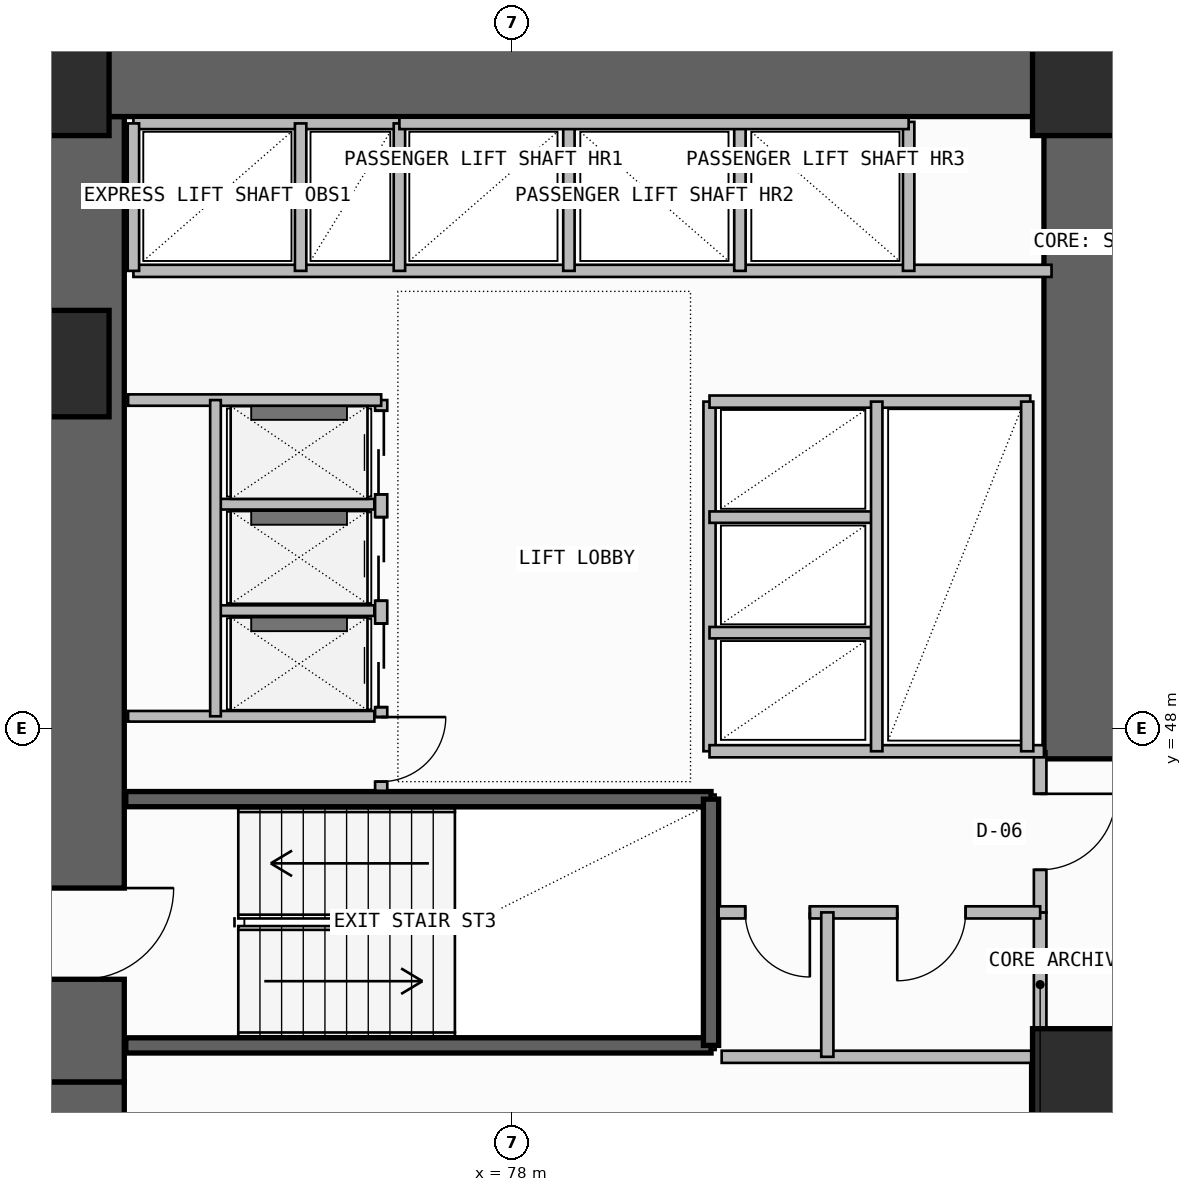
"""IFC4 building model, lengths in metres.
Left out: names, types, materials, properties, quantities, classifications, styles, units other than length and angle.
Written with IfcOpenShell. Run it as: python <this file> out.ifc"""

import sys

from ifc_helpers import new_model, si_unit, direction, frame, frame_2d, origin, origin_2d, place, context, subcontext, project, spatial, rectangle, extrude, element, fill, save


model = new_model("IFC4")
c1 = context("Model", 3, precision=1e-05, world=origin(), true_north=direction((0.0, 1.0)))
c2 = subcontext(c1, "Body", "Model", "MODEL_VIEW")
j1 = project(units=[si_unit("LENGTHUNIT", "METRE"), si_unit("PLANEANGLEUNIT", "RADIAN")], contexts=[c1])
p1 = place(None, origin())
s1 = spatial("IfcSite", under=j1, at=p1, CompositionType="ELEMENT")
p2 = place(p1, origin())
s2 = spatial("IfcBuilding", under=s1, at=p2, CompositionType="ELEMENT")
p3 = place(p2, frame((0.0, 0.0, 84.9)))
s3 = spatial("IfcBuildingStorey", under=s2, at=p3, CompositionType="ELEMENT", Elevation=84.9)
p4 = place(p3, frame((72.35, 35.5, -0.26), z_axis=(0.0, 0.0, 1.0), x_axis=(0.0, 1.0, 0.0)))
e1 = element("IfcWall", 1, at=p4, inside=s3, PredefinedType="SHEAR", context=c2, shape_type="SweptSolid", body=[
    extrude(rectangle(XDim=7.85, YDim=1.1, at=frame_2d((3.925, 0.0))), origin(), (0.0, 0.0, 1.0), 3.6),
])
p5 = place(p4, frame((1.45, 0.0, 0.26)))
e2 = element("IfcOpeningElement", 2, at=p5, cuts=e1, PredefinedType="OPENING", context=c2, shape_type="SweptSolid", body=[
    extrude(rectangle(XDim=1.2, YDim=2.2, at=frame_2d((0.6, 1.1))), frame((0.0, 0.56, 0.0), z_axis=(0.0, -1.0, 0.0), x_axis=(1.0, 0.0, 0.0)), (0.0, 0.0, 1.0), 1.12),
])
p6 = place(p3, frame((72.35, 43.35, -0.26), z_axis=(0.0, 0.0, 1.0), x_axis=(0.0, 1.0, 0.0)))
e3 = element("IfcWall", 3, at=p6, inside=s3, PredefinedType="SHEAR", context=c2, shape_type="SweptSolid", body=[
    extrude(rectangle(XDim=12.7, YDim=1.1, at=frame_2d((6.35, 0.0))), origin(), (0.0, 0.0, 1.0), 3.6),
])
p7 = place(p6, frame((1.35, 0.0, 0.26)))
e4 = element("IfcOpeningElement", 4, at=p7, cuts=e3, PredefinedType="OPENING", context=c2, shape_type="SweptSolid", body=[
    extrude(rectangle(XDim=1.2, YDim=2.2, at=frame_2d((0.6, 1.1))), frame((0.0, 0.56, 0.0), z_axis=(0.0, -1.0, 0.0), x_axis=(1.0, 0.0, 0.0)), (0.0, 0.0, 1.0), 1.12),
])
p8 = place(p3, frame((71.8, 56.6, -0.26), z_axis=(0.0, 0.0, 1.0), x_axis=(1.0, 0.0, 0.0)))
e5 = element("IfcWall", 5, at=p8, inside=s3, PredefinedType="SHEAR", context=c2, shape_type="SweptSolid", body=[
    extrude(rectangle(XDim=14.3, YDim=1.1, at=frame_2d((7.15, 0.0))), origin(), (0.0, 0.0, 1.0), 3.6),
])
p9 = place(p3, frame((85.55, 47.6, -0.26), z_axis=(0.0, 0.0, 1.0), x_axis=(0.0, 1.0, 0.0)))
e6 = element("IfcWall", 6, at=p9, inside=s3, PredefinedType="SHEAR", context=c2, shape_type="SweptSolid", body=[
    extrude(rectangle(XDim=8.45, YDim=1.1, at=frame_2d((4.225, 0.0))), origin(), (0.0, 0.0, 1.0), 3.6),
])
for number, where, z_axis, x_axis in (
    (7, (85.55, 43.35, 0.0), (0.0, 0.0, 1.0), (1.0, 0.0, 0.0)),
    (8, (72.0, 52.8, 0.0), (0.0, 0.0, 1.0), (1.0, 0.0, 0.0)),
    (9, (72.0, 56.5, 0.0), (0.0, 0.0, 1.0), (1.0, 0.0, 0.0)),
    (10, (85.55, 56.5, 0.0), (0.0, 0.0, 1.0), (1.0, 0.0, 0.0)),
):
    element("IfcColumn", number, at=place(p3, frame(where, z_axis=z_axis, x_axis=x_axis)), inside=s3, PredefinedType="COLUMN", context=c2, shape_type="SweptSolid", body=[
        extrude(rectangle(XDim=1.4, YDim=1.4, at=origin_2d()), origin(), (0.0, 0.0, 1.0), 3.6),
    ])
p10 = place(p3, frame((84.92, 38.85, 0.0), z_axis=(0.0, 0.0, 1.0), x_axis=(0.0, 1.0, 0.0)))
e11 = element("IfcWall", 11, at=p10, inside=s3, PredefinedType="SOLIDWALL", context=c2, shape_type="SweptSolid", body=[
    extrude(rectangle(XDim=4.83, YDim=0.2, at=frame_2d((2.415, 0.0))), origin(), (0.0, 0.0, 1.0), 3.34),
])
p11 = place(p10, frame((1.25, 0.0, 0.0)))
e12 = element("IfcOpeningElement", 12, at=p11, cuts=e11, PredefinedType="OPENING", context=c2, shape_type="SweptSolid", body=[
    extrude(rectangle(XDim=1.1, YDim=2.2, at=frame_2d((0.55, 1.1))), frame((0.0, 0.11, 0.0), z_axis=(0.0, -1.0, 0.0), x_axis=(1.0, 0.0, 0.0)), (0.0, 0.0, 1.0), 0.22),
])
for number, where, z_axis, x_axis in (
    (13, (72.92, 43.83, -0.26), (0.0, 0.0, 1.0), (1.0, 0.0, 0.0)),
    (14, (72.92, 47.07, -0.26), (0.0, 0.0, 1.0), (1.0, 0.0, 0.0)),
):
    element("IfcWall", number, at=place(p3, frame(where, z_axis=z_axis, x_axis=x_axis)), inside=s3, PredefinedType="SOLIDWALL", context=c2, shape_type="SweptSolid", body=[
        extrude(rectangle(XDim=7.7, YDim=0.2, at=frame_2d((3.85, 0.0))), origin(), (0.0, 0.0, 1.0), 3.6),
    ])
p12 = place(p3, frame((80.62, 43.83, -0.26), z_axis=(0.0, 0.0, 1.0), x_axis=(0.0, 1.0, 0.0)))
e15 = element("IfcWall", 15, at=p12, inside=s3, PredefinedType="SOLIDWALL", context=c2, shape_type="SweptSolid", body=[
    extrude(rectangle(XDim=3.24, YDim=0.2, at=frame_2d((1.62, 0.0))), origin(), (0.0, 0.0, 1.0), 3.6),
])
p13 = place(p3, frame((84.95, 43.68, 0.0), z_axis=(0.0, 0.0, 1.0), x_axis=(0.0, 1.0, 0.0)))
e16 = element("IfcWall", 16, at=p13, inside=s3, PredefinedType="PLUMBINGWALL", context=c2, shape_type="SweptSolid", body=[
    extrude(rectangle(XDim=1.9, YDim=0.165, at=frame_2d((0.95, 0.0))), origin(), (0.0, 0.0, 1.0), 3.34),
])
p14 = place(p3, frame((84.95, 45.58, 0.0), z_axis=(0.0, 0.0, 1.0), x_axis=(0.0, 1.0, 0.0)))
e17 = element("IfcWall", 17, at=p14, inside=s3, PredefinedType="PARTITIONING", context=c2, shape_type="SweptSolid", body=[
    extrude(rectangle(XDim=2.12, YDim=0.165, at=frame_2d((1.06, 0.0))), origin(), (0.0, 0.0, 1.0), 3.34),
])
p15 = place(p14, frame((0.56, 0.0, 0.0)))
e18 = element("IfcOpeningElement", 18, at=p15, cuts=e17, PredefinedType="OPENING", context=c2, shape_type="SweptSolid", body=[
    extrude(rectangle(XDim=1.0, YDim=2.2, at=frame_2d((0.5, 1.1))), frame((0.0, 0.093, 0.0), z_axis=(0.0, -1.0, 0.0), x_axis=(1.0, 0.0, 0.0)), (0.0, 0.0, 1.0), 0.185),
])
p16 = place(p3, frame((80.72, 45.58, 0.0), z_axis=(0.0, 0.0, 1.0), x_axis=(1.0, 0.0, 0.0)))
e19 = element("IfcWall", 19, at=p16, inside=s3, PredefinedType="PLUMBINGWALL", context=c2, shape_type="SweptSolid", body=[
    extrude(rectangle(XDim=4.23, YDim=0.16, at=frame_2d((2.115, 0.0))), origin(), (0.0, 0.0, 1.0), 3.34),
])
p17 = place(p16, frame((0.35, 0.0, 0.0)))
e20 = element("IfcOpeningElement", 20, at=p17, cuts=e19, PredefinedType="OPENING", context=c2, shape_type="SweptSolid", body=[
    extrude(rectangle(XDim=0.85, YDim=2.05, at=frame_2d((0.425, 1.025))), frame((0.0, 0.09, 0.0), z_axis=(0.0, -1.0, 0.0), x_axis=(1.0, 0.0, 0.0)), (0.0, 0.0, 1.0), 0.18),
])
p18 = place(p16, frame((2.35, 0.0, 0.0)))
e21 = element("IfcOpeningElement", 21, at=p18, cuts=e19, PredefinedType="OPENING", context=c2, shape_type="SweptSolid", body=[
    extrude(rectangle(XDim=0.9, YDim=2.1, at=frame_2d((0.45, 1.05))), frame((0.0, 0.09, 0.0), z_axis=(0.0, -1.0, 0.0), x_axis=(1.0, 0.0, 0.0)), (0.0, 0.0, 1.0), 0.18),
])
p19 = place(p3, frame((80.76, 43.68, 0.0), z_axis=(0.0, 0.0, 1.0), x_axis=(1.0, 0.0, 0.0)))
e22 = element("IfcWall", 22, at=p19, inside=s3, PredefinedType="PLUMBINGWALL", context=c2, shape_type="SweptSolid", body=[
    extrude(rectangle(XDim=4.19, YDim=0.16, at=frame_2d((2.095, 0.0))), origin(), (0.0, 0.0, 1.0), 3.34),
])
p20 = place(p3, frame((82.15, 43.68, 0.0), z_axis=(0.0, 0.0, 1.0), x_axis=(0.0, 1.0, 0.0)))
e23 = element("IfcWall", 23, at=p20, inside=s3, PredefinedType="PLUMBINGWALL", context=c2, shape_type="SweptSolid", body=[
    extrude(rectangle(XDim=1.9, YDim=0.16, at=frame_2d((0.95, 0.0))), origin(), (0.0, 0.0, 1.0), 3.34),
])
p21 = place(p3, frame((76.28, 47.18, 0.0), z_axis=(0.0, 0.0, 1.0), x_axis=(0.0, 1.0, 0.0)))
e24 = element("IfcWall", 24, at=p21, inside=s3, PredefinedType="SOLIDWALL", context=c2, shape_type="SweptSolid", body=[
    extrude(rectangle(XDim=5.14, YDim=0.16, at=frame_2d((2.57, 0.0))), origin(), (0.0, 0.0, 1.0), 3.34),
])
p22 = place(p21, frame((1.1, 0.0, 0.0)))
e25 = element("IfcOpeningElement", 25, at=p22, cuts=e24, PredefinedType="OPENING", context=c2, shape_type="SweptSolid", body=[
    extrude(rectangle(XDim=1.1, YDim=2.25, at=frame_2d((0.55, 1.125))), frame((0.0, 0.09, 0.0), z_axis=(0.0, -1.0, 0.0), x_axis=(1.0, 0.0, 0.0)), (0.0, 0.0, 1.0), 0.18),
])
p23 = place(p21, frame((2.5, 0.0, 0.0)))
e26 = element("IfcOpeningElement", 26, at=p23, cuts=e24, PredefinedType="OPENING", context=c2, shape_type="SweptSolid", body=[
    extrude(rectangle(XDim=1.1, YDim=2.25, at=frame_2d((0.55, 1.125))), frame((0.0, 0.09, 0.0), z_axis=(0.0, -1.0, 0.0), x_axis=(1.0, 0.0, 0.0)), (0.0, 0.0, 1.0), 0.18),
])
p24 = place(p21, frame((3.9, 0.0, 0.0)))
e27 = element("IfcOpeningElement", 27, at=p24, cuts=e24, PredefinedType="OPENING", context=c2, shape_type="SweptSolid", body=[
    extrude(rectangle(XDim=1.1, YDim=2.25, at=frame_2d((0.55, 1.125))), frame((0.0, 0.09, 0.0), z_axis=(0.0, -1.0, 0.0), x_axis=(1.0, 0.0, 0.0)), (0.0, 0.0, 1.0), 0.18),
])
p25 = place(p21, frame((0.12, 0.0, 0.0)))
e28 = element("IfcOpeningElement", 28, at=p25, cuts=e24, PredefinedType="OPENING", context=c2, shape_type="SweptSolid", body=[
    extrude(rectangle(XDim=0.85, YDim=2.05, at=frame_2d((0.425, 1.025))), frame((0.0, 0.09, 0.0), z_axis=(0.0, -1.0, 0.0), x_axis=(1.0, 0.0, 0.0)), (0.0, 0.0, 1.0), 0.18),
])
p26 = place(p3, frame((72.95, 52.32, 0.0), z_axis=(0.0, 0.0, 1.0), x_axis=(1.0, 0.0, 0.0)))
e29 = element("IfcWall", 29, at=p26, inside=s3, PredefinedType="SOLIDWALL", context=c2, shape_type="SweptSolid", body=[
    extrude(rectangle(XDim=3.33, YDim=0.15, at=frame_2d((1.665, 0.0))), origin(), (0.0, 0.0, 1.0), 3.34),
])
p27 = place(p3, frame((72.95, 48.16, 0.0), z_axis=(0.0, 0.0, 1.0), x_axis=(1.0, 0.0, 0.0)))
e30 = element("IfcWall", 30, at=p27, inside=s3, PredefinedType="PLUMBINGWALL", context=c2, shape_type="SweptSolid", body=[
    extrude(rectangle(XDim=3.24, YDim=0.14, at=frame_2d((1.62, 0.0))), origin(), (0.0, 0.0, 1.0), 3.34),
])
for number, where, z_axis, x_axis in (
    (31, (74.15, 49.55, 0.0), (0.0, 0.0, 1.0), (1.0, 0.0, 0.0)),
    (32, (74.15, 50.95, 0.0), (0.0, 0.0, 1.0), (1.0, 0.0, 0.0)),
):
    element("IfcWall", number, at=place(p3, frame(where, z_axis=z_axis, x_axis=x_axis)), inside=s3, PredefinedType="PLUMBINGWALL", context=c2, shape_type="SweptSolid", body=[
        extrude(rectangle(XDim=2.04, YDim=0.14, at=frame_2d((1.02, 0.0))), origin(), (0.0, 0.0, 1.0), 3.34),
    ])
p28 = place(p3, frame((74.1, 48.16, 0.0), z_axis=(0.0, 0.0, 1.0), x_axis=(0.0, 1.0, 0.0)))
e33 = element("IfcWall", 33, at=p28, inside=s3, PredefinedType="PLUMBINGWALL", context=c2, shape_type="SweptSolid", body=[
    extrude(rectangle(XDim=4.16, YDim=0.14, at=frame_2d((2.08, 0.0))), origin(), (0.0, 0.0, 1.0), 3.34),
])
p29 = place(p3, frame((80.6, 47.7, 0.0), z_axis=(0.0, 0.0, 1.0), x_axis=(0.0, 1.0, 0.0)))
e34 = element("IfcWall", 34, at=p29, inside=s3, PredefinedType="SOLIDWALL", context=c2, shape_type="SweptSolid", body=[
    extrude(rectangle(XDim=4.6, YDim=0.16, at=frame_2d((2.3, 0.0))), origin(), (0.0, 0.0, 1.0), 3.34),
])
p30 = place(p3, frame((80.6, 47.7, 0.0), z_axis=(0.0, 0.0, 1.0), x_axis=(1.0, 0.0, 0.0)))
e35 = element("IfcWall", 35, at=p30, inside=s3, PredefinedType="SOLIDWALL", context=c2, shape_type="SweptSolid", body=[
    extrude(rectangle(XDim=4.4, YDim=0.16, at=frame_2d((2.2, 0.0))), origin(), (0.0, 0.0, 1.0), 3.34),
])
p31 = place(p3, frame((80.6, 52.3, 0.0), z_axis=(0.0, 0.0, 1.0), x_axis=(1.0, 0.0, 0.0)))
e36 = element("IfcWall", 36, at=p31, inside=s3, PredefinedType="SOLIDWALL", context=c2, shape_type="SweptSolid", body=[
    extrude(rectangle(XDim=4.22, YDim=0.16, at=frame_2d((2.11, 0.0))), origin(), (0.0, 0.0, 1.0), 3.34),
])
for number, where, z_axis, x_axis in (
    (37, (80.6, 49.26, 0.0), (0.0, 0.0, 1.0), (1.0, 0.0, 0.0)),
    (38, (80.6, 50.78, 0.0), (0.0, 0.0, 1.0), (1.0, 0.0, 0.0)),
):
    element("IfcWall", number, at=place(p3, frame(where, z_axis=z_axis, x_axis=x_axis)), inside=s3, PredefinedType="PLUMBINGWALL", context=c2, shape_type="SweptSolid", body=[
        extrude(rectangle(XDim=2.2, YDim=0.15, at=frame_2d((1.1, 0.0))), origin(), (0.0, 0.0, 1.0), 3.34),
    ])
p32 = place(p3, frame((82.8, 47.7, 0.0), z_axis=(0.0, 0.0, 1.0), x_axis=(0.0, 1.0, 0.0)))
e39 = element("IfcWall", 39, at=p32, inside=s3, PredefinedType="PLUMBINGWALL", context=c2, shape_type="SweptSolid", body=[
    extrude(rectangle(XDim=4.6, YDim=0.15, at=frame_2d((2.3, 0.0))), origin(), (0.0, 0.0, 1.0), 3.34),
])
p33 = place(p3, frame((84.78, 47.7, 0.0), z_axis=(0.0, 0.0, 1.0), x_axis=(0.0, 1.0, 0.0)))
e40 = element("IfcWall", 40, at=p33, inside=s3, PredefinedType="SOLIDWALL", context=c2, shape_type="SweptSolid", body=[
    extrude(rectangle(XDim=4.6, YDim=0.16, at=frame_2d((2.3, 0.0))), origin(), (0.0, 0.0, 1.0), 3.34),
])
p34 = place(p3, frame((73.02, 54.02, 0.0), z_axis=(0.0, 0.0, 1.0), x_axis=(1.0, 0.0, 0.0)))
e41 = element("IfcWall", 41, at=p34, inside=s3, PredefinedType="SOLIDWALL", context=c2, shape_type="SweptSolid", body=[
    extrude(rectangle(XDim=12.08, YDim=0.16, at=frame_2d((6.04, 0.0))), origin(), (0.0, 0.0, 1.0), 3.34),
])
p35 = place(p3, frame((73.02, 55.96, 0.0), z_axis=(0.0, 0.0, 1.0), x_axis=(1.0, 0.0, 0.0)))
e42 = element("IfcWall", 42, at=p35, inside=s3, PredefinedType="SOLIDWALL", context=c2, shape_type="SweptSolid", body=[
    extrude(rectangle(XDim=3.5, YDim=0.15, at=frame_2d((1.75, 0.0))), origin(), (0.0, 0.0, 1.0), 3.34),
])
p36 = place(p3, frame((73.02, 54.02, 0.0), z_axis=(0.0, 0.0, 1.0), x_axis=(0.0, 1.0, 0.0)))
e43 = element("IfcWall", 43, at=p36, inside=s3, PredefinedType="PLUMBINGWALL", context=c2, shape_type="SweptSolid", body=[
    extrude(rectangle(XDim=1.94, YDim=0.15, at=frame_2d((0.97, 0.0))), origin(), (0.0, 0.0, 1.0), 3.34),
])
p37 = place(p3, frame((76.52, 54.02, 0.0), z_axis=(0.0, 0.0, 1.0), x_axis=(0.0, 1.0, 0.0)))
e44 = element("IfcWall", 44, at=p37, inside=s3, PredefinedType="SOLIDWALL", context=c2, shape_type="SweptSolid", body=[
    extrude(rectangle(XDim=1.94, YDim=0.15, at=frame_2d((0.97, 0.0))), origin(), (0.0, 0.0, 1.0), 3.34),
])
p38 = place(p3, frame((75.22, 54.02, 0.0), z_axis=(0.0, 0.0, 1.0), x_axis=(0.0, 1.0, 0.0)))
e45 = element("IfcWall", 45, at=p38, inside=s3, PredefinedType="PLUMBINGWALL", context=c2, shape_type="SweptSolid", body=[
    extrude(rectangle(XDim=1.94, YDim=0.15, at=frame_2d((0.97, 0.0))), origin(), (0.0, 0.0, 1.0), 3.34),
])
for number, where, z_axis, x_axis in (
    (46, (78.75, 54.02, 0.0), (0.0, 0.0, 1.0), (0.0, 1.0, 0.0)),
    (47, (81.0, 54.02, 0.0), (0.0, 0.0, 1.0), (0.0, 1.0, 0.0)),
):
    element("IfcWall", number, at=place(p3, frame(where, z_axis=z_axis, x_axis=x_axis)), inside=s3, PredefinedType="PLUMBINGWALL", context=c2, shape_type="SweptSolid", body=[
        extrude(rectangle(XDim=1.96, YDim=0.15, at=frame_2d((0.98, 0.0))), origin(), (0.0, 0.0, 1.0), 3.34),
    ])
p39 = place(p3, frame((83.22, 54.02, 0.0), z_axis=(0.0, 0.0, 1.0), x_axis=(0.0, 1.0, 0.0)))
e48 = element("IfcWall", 48, at=p39, inside=s3, PredefinedType="SOLIDWALL", context=c2, shape_type="SweptSolid", body=[
    extrude(rectangle(XDim=1.96, YDim=0.15, at=frame_2d((0.98, 0.0))), origin(), (0.0, 0.0, 1.0), 3.34),
])
p40 = place(p3, frame((76.52, 55.96, 0.0), z_axis=(0.0, 0.0, 1.0), x_axis=(1.0, 0.0, 0.0)))
e49 = element("IfcWall", 49, at=p40, inside=s3, PredefinedType="SOLIDWALL", context=c2, shape_type="SweptSolid", body=[
    extrude(rectangle(XDim=6.7, YDim=0.15, at=frame_2d((3.35, 0.0))), origin(), (0.0, 0.0, 1.0), 3.34),
])
p41 = place(p7, frame((1.2, 0.0, 0.0), z_axis=(0.0, 0.0, 1.0), x_axis=(-1.0, 0.0, 0.0)))
e50 = element("IfcDoor", 50, at=p41, inside=s3, OperationType="SINGLE_SWING_LEFT", PredefinedType="USERDEFINED", context=c2, shape_type="SweptSolid", body=[
    extrude(rectangle(XDim=1.2, YDim=2.2, at=frame_2d((0.6, 1.1))), frame((0.0, 0.025, 0.0), z_axis=(0.0, -1.0, 0.0), x_axis=(1.0, 0.0, 0.0)), (0.0, 0.0, 1.0), 0.05),
])
fill(e4, e50)
p42 = place(p15, frame((1.0, 0.0, 0.0), z_axis=(0.0, 0.0, 1.0), x_axis=(-1.0, 0.0, 0.0)))
e51 = element("IfcDoor", 51, at=p42, inside=s3, OperationType="SINGLE_SWING_LEFT", PredefinedType="DOOR", context=c2, shape_type="SweptSolid", body=[
    extrude(rectangle(XDim=1.0, YDim=2.2, at=frame_2d((0.5, 1.1))), frame((0.0, 0.025, 0.0), z_axis=(0.0, -1.0, 0.0), x_axis=(1.0, 0.0, 0.0)), (0.0, 0.0, 1.0), 0.05),
])
fill(e18, e51)
p43 = place(p17, frame((0.85, 0.0, 0.0), z_axis=(0.0, 0.0, 1.0), x_axis=(-1.0, 0.0, 0.0)))
e52 = element("IfcDoor", 52, at=p43, inside=s3, OperationType="SINGLE_SWING_LEFT", PredefinedType="DOOR", context=c2, shape_type="SweptSolid", body=[
    extrude(rectangle(XDim=0.85, YDim=2.05, at=frame_2d((0.425, 1.025))), frame((0.0, 0.025, 0.0), z_axis=(0.0, -1.0, 0.0), x_axis=(1.0, 0.0, 0.0)), (0.0, 0.0, 1.0), 0.05),
])
fill(e20, e52)
p44 = place(p18, frame((0.9, 0.0, 0.0), z_axis=(0.0, 0.0, 1.0), x_axis=(-1.0, 0.0, 0.0)))
e53 = element("IfcDoor", 53, at=p44, inside=s3, OperationType="SINGLE_SWING_RIGHT", PredefinedType="DOOR", context=c2, shape_type="SweptSolid", body=[
    extrude(rectangle(XDim=0.9, YDim=2.1, at=frame_2d((0.45, 1.05))), frame((0.0, 0.025, 0.0), z_axis=(0.0, -1.0, 0.0), x_axis=(1.0, 0.0, 0.0)), (0.0, 0.0, 1.0), 0.05),
])
fill(e21, e53)
p45 = place(p22, origin())
e54 = element("IfcDoor", 54, at=p45, inside=s3, OperationType="DOUBLE_DOOR_SLIDING", PredefinedType="DOOR", context=c2, shape_type="SweptSolid", body=[
    extrude(rectangle(XDim=1.1, YDim=2.25, at=frame_2d((0.55, 1.125))), frame((0.0, 0.025, 0.0), z_axis=(0.0, -1.0, 0.0), x_axis=(1.0, 0.0, 0.0)), (0.0, 0.0, 1.0), 0.05),
])
fill(e25, e54)
p46 = place(p23, origin())
e55 = element("IfcDoor", 55, at=p46, inside=s3, OperationType="DOUBLE_DOOR_SLIDING", PredefinedType="DOOR", context=c2, shape_type="SweptSolid", body=[
    extrude(rectangle(XDim=1.1, YDim=2.25, at=frame_2d((0.55, 1.125))), frame((0.0, 0.025, 0.0), z_axis=(0.0, -1.0, 0.0), x_axis=(1.0, 0.0, 0.0)), (0.0, 0.0, 1.0), 0.05),
])
fill(e26, e55)
p47 = place(p24, origin())
e56 = element("IfcDoor", 56, at=p47, inside=s3, OperationType="DOUBLE_DOOR_SLIDING", PredefinedType="DOOR", context=c2, shape_type="SweptSolid", body=[
    extrude(rectangle(XDim=1.1, YDim=2.25, at=frame_2d((0.55, 1.125))), frame((0.0, 0.025, 0.0), z_axis=(0.0, -1.0, 0.0), x_axis=(1.0, 0.0, 0.0)), (0.0, 0.0, 1.0), 0.05),
])
fill(e27, e56)
p48 = place(p25, frame((0.85, 0.0, 0.0), z_axis=(0.0, 0.0, 1.0), x_axis=(-1.0, 0.0, 0.0)))
e57 = element("IfcDoor", 57, at=p48, inside=s3, OperationType="SINGLE_SWING_LEFT", PredefinedType="DOOR", context=c2, shape_type="SweptSolid", body=[
    extrude(rectangle(XDim=0.85, YDim=2.05, at=frame_2d((0.425, 1.025))), frame((0.0, 0.025, 0.0), z_axis=(0.0, -1.0, 0.0), x_axis=(1.0, 0.0, 0.0)), (0.0, 0.0, 1.0), 0.05),
])
fill(e28, e57)
save(model, sys.argv[1])
